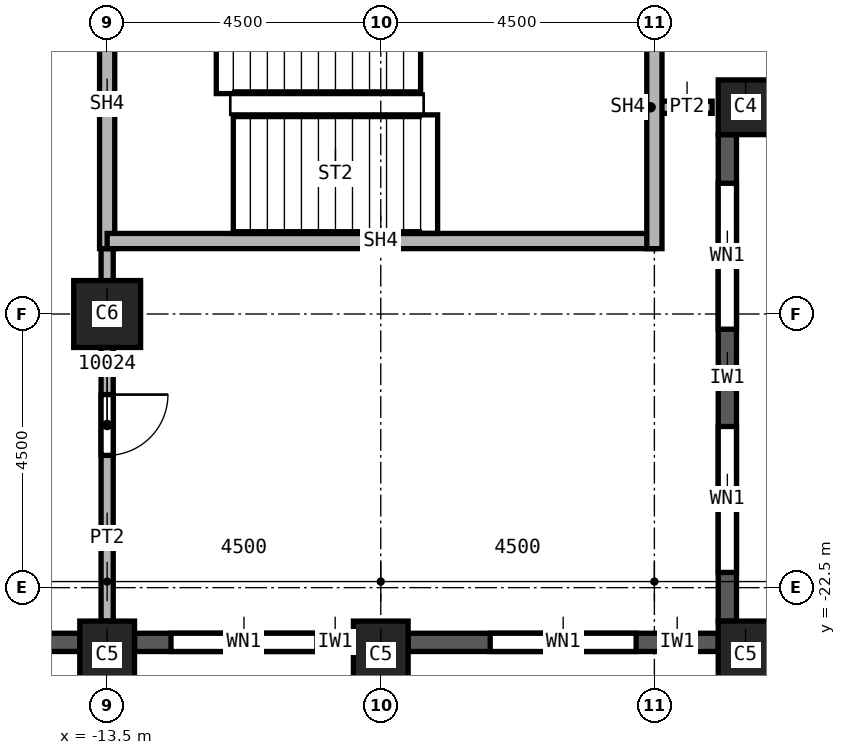
"""IFC4 building model, lengths in metres.
Left out: names, types, materials, properties, quantities, classifications, styles, units other than length and angle.
Written with IfcOpenShell. Run it as: python <this file> out.ifc"""

import sys

from ifc_helpers import new_model, si_unit, direction, frame, frame_2d, origin, origin_2d, place, context, subcontext, project, spatial, rectangle, extrude, element, fill, save


model = new_model("IFC4")
c1 = context("Model", 3, precision=1e-05, world=origin(), true_north=direction((0.0, 1.0)))
c2 = subcontext(c1, "Body", "Model", "MODEL_VIEW")
j1 = project(units=[si_unit("LENGTHUNIT", "METRE"), si_unit("PLANEANGLEUNIT", "RADIAN")], contexts=[c1])
p1 = place(None, origin())
s1 = spatial("IfcSite", under=j1, at=p1, CompositionType="ELEMENT")
p2 = place(p1, origin())
s2 = spatial("IfcBuilding", under=s1, at=p2, CompositionType="ELEMENT")
p3 = place(p2, frame((0.0, 0.0, 170.0)))
s3 = spatial("IfcBuildingStorey", under=s2, at=p3, CompositionType="ELEMENT", Elevation=170.0)
p4 = place(p3, frame((-13.5, -18.0, 0.0), z_axis=(0.0, 0.0, 1.0), x_axis=(1.0, 0.0, 0.0)))
e1 = element("IfcColumn", 1, at=p4, inside=s3, PredefinedType="COLUMN", context=c2, shape_type="SweptSolid", body=[
    extrude(rectangle(XDim=1.1, YDim=1.1, at=origin_2d()), origin(), (0.0, 0.0, 1.0), 3.7),
])
for number, where, z_axis, x_axis in (
    (2, (-3.0, -23.6, 0.0), (0.0, 0.0, 1.0), (1.0, 0.0, 0.0)),
    (3, (-9.0, -23.6, 0.0), (0.0, 0.0, 1.0), (1.0, 0.0, 0.0)),
    (4, (-13.5, -23.6, 0.0), (0.0, 0.0, 1.0), (1.0, 0.0, 0.0)),
):
    element("IfcColumn", number, at=place(p3, frame(where, z_axis=z_axis, x_axis=x_axis)), inside=s3, PredefinedType="COLUMN", context=c2, shape_type="SweptSolid", body=[
        extrude(rectangle(XDim=0.9, YDim=1.1, at=origin_2d()), origin(), (0.0, 0.0, 1.0), 3.7),
    ])
p5 = place(p3, frame((-3.0, -14.6, 0.0), z_axis=(0.0, 0.0, 1.0), x_axis=(1.0, 0.0, 0.0)))
e5 = element("IfcColumn", 5, at=p5, inside=s3, PredefinedType="COLUMN", context=c2, shape_type="SweptSolid", body=[
    extrude(rectangle(XDim=0.9, YDim=0.9, at=origin_2d()), origin(), (0.0, 0.0, 1.0), 3.7),
])
p6 = place(p3, frame((-17.55, -23.4, 0.0), z_axis=(0.0, 0.0, 1.0), x_axis=(1.0, 0.0, 0.0)))
e6 = element("IfcWall", 6, at=p6, inside=s3, PredefinedType="SOLIDWALL", context=c2, shape_type="SweptSolid", body=[
    extrude(rectangle(XDim=3.6, YDim=0.3, at=frame_2d((1.8, 0.0))), origin(), (0.0, 0.0, 1.0), 3.1),
])
p7 = place(p6, frame((0.775, 0.0, 0.8)))
e7 = element("IfcOpeningElement", 7, at=p7, cuts=e6, PredefinedType="OPENING", context=c2, shape_type="SweptSolid", body=[
    extrude(rectangle(XDim=1.0, YDim=1.95, at=frame_2d((0.5, 0.975))), frame((0.0, 0.15, 0.0), z_axis=(0.0, -1.0, 0.0), x_axis=(1.0, 0.0, 0.0)), (0.0, 0.0, 1.0), 0.3),
])
p8 = place(p6, frame((2.375, 0.0, 0.8)))
e8 = element("IfcOpeningElement", 8, at=p8, cuts=e6, PredefinedType="OPENING", context=c2, shape_type="SweptSolid", body=[
    extrude(rectangle(XDim=0.6, YDim=1.95, at=frame_2d((0.3, 0.975))), frame((0.0, 0.15, 0.0), z_axis=(0.0, -1.0, 0.0), x_axis=(1.0, 0.0, 0.0)), (0.0, 0.0, 1.0), 0.3),
])
p9 = place(p3, frame((-13.05, -23.4, 0.0), z_axis=(0.0, 0.0, 1.0), x_axis=(1.0, 0.0, 0.0)))
e9 = element("IfcWall", 9, at=p9, inside=s3, PredefinedType="SOLIDWALL", context=c2, shape_type="SweptSolid", body=[
    extrude(rectangle(XDim=3.6, YDim=0.3, at=frame_2d((1.8, 0.0))), origin(), (0.0, 0.0, 1.0), 3.1),
])
p10 = place(p9, frame((0.6, 0.0, 0.8)))
e10 = element("IfcOpeningElement", 10, at=p10, cuts=e9, PredefinedType="OPENING", context=c2, shape_type="SweptSolid", body=[
    extrude(rectangle(XDim=2.4, YDim=1.95, at=frame_2d((1.2, 0.975))), frame((0.0, 0.15, 0.0), z_axis=(0.0, -1.0, 0.0), x_axis=(1.0, 0.0, 0.0)), (0.0, 0.0, 1.0), 0.3),
])
p11 = place(p3, frame((-8.55, -23.4, 0.0), z_axis=(0.0, 0.0, 1.0), x_axis=(1.0, 0.0, 0.0)))
e11 = element("IfcWall", 11, at=p11, inside=s3, PredefinedType="SOLIDWALL", context=c2, shape_type="SweptSolid", body=[
    extrude(rectangle(XDim=5.1, YDim=0.3, at=frame_2d((2.55, 0.0))), origin(), (0.0, 0.0, 1.0), 3.1),
])
p12 = place(p11, frame((1.35, 0.0, 0.8)))
e12 = element("IfcOpeningElement", 12, at=p12, cuts=e11, PredefinedType="OPENING", context=c2, shape_type="SweptSolid", body=[
    extrude(rectangle(XDim=2.4, YDim=1.95, at=frame_2d((1.2, 0.975))), frame((0.0, 0.15, 0.0), z_axis=(0.0, -1.0, 0.0), x_axis=(1.0, 0.0, 0.0)), (0.0, 0.0, 1.0), 0.3),
])
p13 = place(p3, frame((-3.3, -23.05, 0.0), z_axis=(0.0, 0.0, 1.0), x_axis=(0.0, 1.0, 0.0)))
e13 = element("IfcWall", 13, at=p13, inside=s3, PredefinedType="SOLIDWALL", context=c2, shape_type="SweptSolid", body=[
    extrude(rectangle(XDim=8.0, YDim=0.3, at=frame_2d((4.0, 0.0))), origin(), (0.0, 0.0, 1.0), 3.1),
])
p14 = place(p13, frame((0.8, 0.0, 0.8)))
e14 = element("IfcOpeningElement", 14, at=p14, cuts=e13, PredefinedType="OPENING", context=c2, shape_type="SweptSolid", body=[
    extrude(rectangle(XDim=2.4, YDim=1.95, at=frame_2d((1.2, 0.975))), frame((0.0, 0.15, 0.0), z_axis=(0.0, -1.0, 0.0), x_axis=(1.0, 0.0, 0.0)), (0.0, 0.0, 1.0), 0.3),
])
p15 = place(p13, frame((4.8, 0.0, 0.8)))
e15 = element("IfcOpeningElement", 15, at=p15, cuts=e13, PredefinedType="OPENING", context=c2, shape_type="SweptSolid", body=[
    extrude(rectangle(XDim=2.4, YDim=1.95, at=frame_2d((1.2, 0.975))), frame((0.0, 0.15, 0.0), z_axis=(0.0, -1.0, 0.0), x_axis=(1.0, 0.0, 0.0)), (0.0, 0.0, 1.0), 0.3),
])
p16 = place(p3, frame((-13.5, -16.675, 0.0), z_axis=(0.0, 0.0, 1.0), x_axis=(0.0, -1.0, 0.0)))
e16 = element("IfcWall", 16, at=p16, inside=s3, PredefinedType="PARTITIONING", context=c2, shape_type="SweptSolid", body=[
    extrude(rectangle(XDim=6.375, YDim=0.2, at=frame_2d((3.188, 0.0))), origin(), (0.0, 0.0, 1.0), 3.7),
])
p17 = place(p16, frame((2.65, 0.0, 0.0)))
e17 = element("IfcOpeningElement", 17, at=p17, cuts=e16, PredefinedType="OPENING", context=c2, shape_type="SweptSolid", body=[
    extrude(rectangle(XDim=1.0, YDim=2.1, at=frame_2d((0.5, 1.05))), frame((0.0, 0.1, 0.0), z_axis=(0.0, -1.0, 0.0), x_axis=(1.0, 0.0, 0.0)), (0.0, 0.0, 1.0), 0.2),
])
p18 = place(p3, frame((-3.55, -14.6, 0.0), z_axis=(0.0, 0.0, 1.0), x_axis=(-1.0, 0.0, 0.0)))
e18 = element("IfcWall", 18, at=p18, inside=s3, PredefinedType="PARTITIONING", context=c2, shape_type="SweptSolid", body=[
    extrude(rectangle(XDim=0.95, YDim=0.2, at=frame_2d((0.475, 0.0))), origin(), (0.0, 0.0, 1.0), 3.7),
])
p19 = place(p3, frame((-13.5, -12.175, 0.0), z_axis=(0.0, 0.0, 1.0), x_axis=(0.0, -1.0, 0.0)))
e19 = element("IfcWall", 19, at=p19, inside=s3, PredefinedType="SOLIDWALL", context=c2, shape_type="SweptSolid", body=[
    extrude(rectangle(XDim=4.75, YDim=0.25, at=frame_2d((2.375, 0.0))), origin(), (0.0, 0.0, 1.0), 3.7),
])
p20 = place(p3, frame((-4.5, -16.8, 0.0), z_axis=(0.0, 0.0, 1.0), x_axis=(-1.0, 0.0, 0.0)))
e20 = element("IfcWall", 20, at=p20, inside=s3, PredefinedType="SOLIDWALL", context=c2, shape_type="SweptSolid", body=[
    extrude(rectangle(XDim=9.0, YDim=0.25, at=frame_2d((4.5, 0.0))), origin(), (0.0, 0.0, 1.0), 3.7),
])
p21 = place(p3, frame((-4.5, -12.3, 0.0), z_axis=(0.0, 0.0, 1.0), x_axis=(0.0, -1.0, 0.0)))
e21 = element("IfcWall", 21, at=p21, inside=s3, PredefinedType="SOLIDWALL", context=c2, shape_type="SweptSolid", body=[
    extrude(rectangle(XDim=4.625, YDim=0.25, at=frame_2d((2.312, 0.0))), origin(), (0.0, 0.0, 1.0), 3.7),
])
p22 = place(p10, origin())
e22 = element("IfcWindow", 22, at=p22, inside=s3, PartitioningType="SINGLE_PANEL", PredefinedType="WINDOW", context=c2, shape_type="SweptSolid", body=[
    extrude(rectangle(XDim=2.4, YDim=1.95, at=frame_2d((1.2, 0.975))), frame((0.0, 0.03, 0.0), z_axis=(0.0, -1.0, 0.0), x_axis=(1.0, 0.0, 0.0)), (0.0, 0.0, 1.0), 0.06),
])
fill(e10, e22)
p23 = place(p12, origin())
e23 = element("IfcWindow", 23, at=p23, inside=s3, PartitioningType="SINGLE_PANEL", PredefinedType="WINDOW", context=c2, shape_type="SweptSolid", body=[
    extrude(rectangle(XDim=2.4, YDim=1.95, at=frame_2d((1.2, 0.975))), frame((0.0, 0.03, 0.0), z_axis=(0.0, -1.0, 0.0), x_axis=(1.0, 0.0, 0.0)), (0.0, 0.0, 1.0), 0.06),
])
fill(e12, e23)
p24 = place(p14, origin())
e24 = element("IfcWindow", 24, at=p24, inside=s3, PartitioningType="SINGLE_PANEL", PredefinedType="WINDOW", context=c2, shape_type="SweptSolid", body=[
    extrude(rectangle(XDim=2.4, YDim=1.95, at=frame_2d((1.2, 0.975))), frame((0.0, 0.03, 0.0), z_axis=(0.0, -1.0, 0.0), x_axis=(1.0, 0.0, 0.0)), (0.0, 0.0, 1.0), 0.06),
])
fill(e14, e24)
p25 = place(p15, origin())
e25 = element("IfcWindow", 25, at=p25, inside=s3, PartitioningType="SINGLE_PANEL", PredefinedType="WINDOW", context=c2, shape_type="SweptSolid", body=[
    extrude(rectangle(XDim=2.4, YDim=1.95, at=frame_2d((1.2, 0.975))), frame((0.0, 0.03, 0.0), z_axis=(0.0, -1.0, 0.0), x_axis=(1.0, 0.0, 0.0)), (0.0, 0.0, 1.0), 0.06),
])
fill(e15, e25)
p26 = place(p17, origin())
e26 = element("IfcDoor", 26, at=p26, inside=s3, OperationType="SINGLE_SWING_LEFT", PredefinedType="DOOR", context=c2, shape_type="SweptSolid", body=[
    extrude(rectangle(XDim=1.0, YDim=2.1, at=frame_2d((0.5, 1.05))), frame((0.0, 0.025, 0.0), z_axis=(0.0, -1.0, 0.0), x_axis=(1.0, 0.0, 0.0)), (0.0, 0.0, 1.0), 0.05),
])
fill(e17, e26)
save(model, sys.argv[1])
